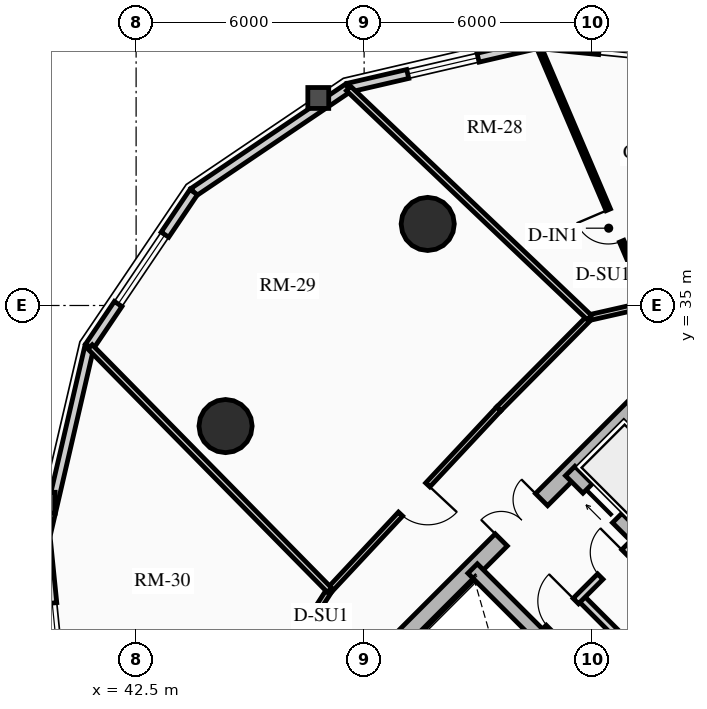
"""IFC4 building model, lengths in metres.
Left out: names, types, materials, properties, quantities, classifications, styles, units other than length and angle.
Written with IfcOpenShell. Run it as: python <this file> out.ifc"""

import sys

from ifc_helpers import new_model, si_unit, direction, frame, frame_2d, origin, origin_2d, place, context, subcontext, project, spatial, rectangle, circle, extrude, source, transform, mapped, element, fill, save


model = new_model("IFC4")
c1 = context("Model", 3, precision=1e-05, world=origin(), true_north=direction((0.0, 1.0)))
c2 = subcontext(c1, "Body", "Model", "MODEL_VIEW")
j1 = project(units=[si_unit("LENGTHUNIT", "METRE"), si_unit("PLANEANGLEUNIT", "RADIAN")], contexts=[c1])
p1 = place(None, origin())
s1 = spatial("IfcSite", under=j1, at=p1, CompositionType="ELEMENT")
p2 = place(p1, origin())
s2 = spatial("IfcBuilding", under=s1, at=p2, CompositionType="ELEMENT")
p3 = place(p2, frame((0.0, 0.0, 81.79)))
s3 = spatial("IfcBuildingStorey", under=s2, at=p3, CompositionType="ELEMENT", Elevation=81.79)
p4 = place(p3, frame((48.856, 25.578, 0.0), z_axis=(0.0, 0.0, 1.0), x_axis=(0.707106781187, 0.707106781187, 0.0)))
e1 = element("IfcWall", 1, at=p4, inside=s3, PredefinedType="SHEAR", context=c2, shape_type="SweptSolid", body=[
    extrude(rectangle(XDim=10.7, YDim=0.45, at=frame_2d((5.35, 0.0))), origin(), (0.0, 0.0, 1.0), 2.91),
])
m1 = source(origin(), c2, "Body", "SweptSolid", [
    extrude(rectangle(XDim=1.5, YDim=2.02, at=frame_2d((0.75, 1.01))), frame((0.0, 0.235, 0.0), z_axis=(0.0, -1.0, 0.0), x_axis=(1.0, 0.0, 0.0)), (0.0, 0.0, 1.0), 0.47),
])
p5 = place(p4, frame((4.6, 0.0, 0.0)))
e2 = element("IfcOpeningElement", 2, at=p5, cuts=e1, PredefinedType="OPENING", context=c2, shape_type="MappedRepresentation", body=[
    mapped(m1, transform((0.0, 0.0, 0.0), x_axis=(1.0, 0.0, 0.0), y_axis=(0.0, 1.0, 0.0), z_axis=(0.0, 0.0, 1.0), scale=1.0)),
])
p6 = place(p3, frame((61.078, 18.355, 0.0), z_axis=(0.0, 0.0, 1.0), x_axis=(-0.707106781187, 0.707106781187, 0.0)))
e3 = element("IfcWall", 3, at=p6, inside=s3, PredefinedType="SHEAR", context=c2, shape_type="SweptSolid", body=[
    extrude(rectangle(XDim=13.75, YDim=0.35, at=frame_2d((6.875, 0.0))), origin(), (0.0, 0.0, 1.0), 2.91),
])
m2 = source(origin(), c2, "Body", "SweptSolid", [
    extrude(rectangle(XDim=1.1, YDim=2.015, at=frame_2d((0.55, 1.007))), frame((0.0, 0.185, 0.0), z_axis=(0.0, -1.0, 0.0), x_axis=(1.0, 0.0, 0.0)), (0.0, 0.0, 1.0), 0.37),
])
p7 = place(p6, frame((4.875, 0.0, 0.0)))
e4 = element("IfcOpeningElement", 4, at=p7, cuts=e3, PredefinedType="OPENING", context=c2, shape_type="MappedRepresentation", body=[
    mapped(m2, transform((0.0, 0.0, 0.0), x_axis=(1.0, 0.0, 0.0), y_axis=(0.0, 1.0, 0.0), z_axis=(0.0, 0.0, 1.0), scale=1.0)),
])
m3 = source(origin(), c2, "Body", "SweptSolid", [
    extrude(rectangle(XDim=1.15, YDim=2.02, at=frame_2d((0.575, 1.01))), frame((0.0, 0.185, 0.0), z_axis=(0.0, -1.0, 0.0), x_axis=(1.0, 0.0, 0.0)), (0.0, 0.0, 1.0), 0.37),
])
p8 = place(p6, frame((7.295, 0.0, 0.0)))
e5 = element("IfcOpeningElement", 5, at=p8, cuts=e3, PredefinedType="OPENING", context=c2, shape_type="MappedRepresentation", body=[
    mapped(m3, transform((0.0, 0.0, 0.0), x_axis=(1.0, 0.0, 0.0), y_axis=(0.0, 1.0, 0.0), z_axis=(0.0, 0.0, 1.0), scale=1.0)),
])
p9 = place(p3, frame((63.645, 20.922, 0.0), z_axis=(0.0, 0.0, 1.0), x_axis=(-0.707106781187, 0.707106781187, 0.0)))
e6 = element("IfcWall", 6, at=p9, inside=s3, PredefinedType="SHEAR", context=c2, shape_type="SweptSolid", body=[
    extrude(rectangle(XDim=13.75, YDim=0.35, at=frame_2d((6.875, 0.0))), origin(), (0.0, 0.0, 1.0), 2.91),
])
p10 = place(p9, frame((10.0, 0.0, 0.0)))
e7 = element("IfcOpeningElement", 7, at=p10, cuts=e6, PredefinedType="OPENING", context=c2, shape_type="MappedRepresentation", body=[
    mapped(m2, transform((0.0, 0.0, 0.0), x_axis=(1.0, 0.0, 0.0), y_axis=(0.0, 1.0, 0.0), z_axis=(0.0, 0.0, 1.0), scale=1.0)),
])
p11 = place(p9, frame((12.0, 0.0, 0.0)))
e8 = element("IfcOpeningElement", 8, at=p11, cuts=e6, PredefinedType="OPENING", context=c2, shape_type="MappedRepresentation", body=[
    mapped(m2, transform((0.0, 0.0, 0.0), x_axis=(1.0, 0.0, 0.0), y_axis=(0.0, 1.0, 0.0), z_axis=(0.0, 0.0, 1.0), scale=1.0)),
])
p12 = place(p9, frame((5.305, 0.0, 0.0)))
e9 = element("IfcOpeningElement", 9, at=p12, cuts=e6, PredefinedType="OPENING", context=c2, shape_type="MappedRepresentation", body=[
    mapped(m3, transform((0.0, 0.0, 0.0), x_axis=(1.0, 0.0, 0.0), y_axis=(0.0, 1.0, 0.0), z_axis=(0.0, 0.0, 1.0), scale=1.0)),
])
for number, where, z_axis, x_axis in (
    (10, (50.173, 37.146, 0.0), (0.0, 0.0, 1.0), (1.0, 0.0, 0.0)),
    (11, (44.854, 31.827, 0.0), (0.0, 0.0, 1.0), (1.0, 0.0, 0.0)),
):
    element("IfcColumn", number, at=place(p3, frame(where, z_axis=z_axis, x_axis=x_axis)), inside=s3, PredefinedType="USERDEFINED", context=c2, shape_type="SweptSolid", body=[
        extrude(circle(Radius=0.7, at=origin_2d()), origin(), (0.0, 0.0, 1.0), 2.91),
    ])
p13 = place(p3, frame((53.067, 41.885, 0.0), z_axis=(0.0, 0.0, 1.0), x_axis=(0.994971754311, -0.10015591906, 0.0)))
e12 = element("IfcWall", 12, at=p13, inside=s3, PredefinedType="SOLIDWALL", context=c2, shape_type="SweptSolid", body=[
    extrude(rectangle(XDim=5.448, YDim=0.24, at=frame_2d((2.724, 0.0))), origin(), (0.0, 0.0, 1.0), 2.179),
])
m4 = source(origin(), c2, "Body", "SweptSolid", [
    extrude(rectangle(XDim=2.2, YDim=1.35, at=frame_2d((1.1, 0.675))), frame((0.0, 0.13, 0.0), z_axis=(0.0, -1.0, 0.0), x_axis=(1.0, 0.0, 0.0)), (0.0, 0.0, 1.0), 0.26),
])
p14 = place(p13, frame((1.624, 0.0, 0.65)))
e13 = element("IfcOpeningElement", 13, at=p14, cuts=e12, PredefinedType="OPENING", context=c2, shape_type="MappedRepresentation", body=[
    mapped(m4, transform((0.0, 0.0, 0.0), x_axis=(1.0, 0.0, 0.0), y_axis=(0.0, 1.0, 0.0), z_axis=(0.0, 0.0, 1.0), scale=1.0)),
])
p15 = place(p3, frame((48.08, 40.729, 0.0), z_axis=(0.0, 0.0, 1.0), x_axis=(0.974165631126, 0.225834725257, 0.0)))
e14 = element("IfcWall", 14, at=p15, inside=s3, PredefinedType="SOLIDWALL", context=c2, shape_type="SweptSolid", body=[
    extrude(rectangle(XDim=5.119, YDim=0.24, at=frame_2d((2.56, 0.0))), origin(), (0.0, 0.0, 1.0), 2.179),
])
m5 = source(origin(), c2, "Body", "SweptSolid", [
    extrude(rectangle(XDim=1.9, YDim=1.35, at=frame_2d((0.95, 0.675))), frame((0.0, 0.13, 0.0), z_axis=(0.0, -1.0, 0.0), x_axis=(1.0, 0.0, 0.0)), (0.0, 0.0, 1.0), 0.26),
])
p16 = place(p15, frame((1.609, 0.0, 0.65)))
e15 = element("IfcOpeningElement", 15, at=p16, cuts=e14, PredefinedType="OPENING", context=c2, shape_type="MappedRepresentation", body=[
    mapped(m5, transform((0.0, 0.0, 0.0), x_axis=(1.0, 0.0, 0.0), y_axis=(0.0, 1.0, 0.0), z_axis=(0.0, 0.0, 1.0), scale=1.0)),
])
p17 = place(p3, frame((44.015, 37.985, 0.0), z_axis=(0.0, 0.0, 1.0), x_axis=(0.828781148131, 0.559572880421, 0.0)))
e16 = element("IfcWall", 16, at=p17, inside=s3, PredefinedType="SOLIDWALL", context=c2, shape_type="SweptSolid", body=[
    extrude(rectangle(XDim=4.905, YDim=0.24, at=frame_2d((2.452, 0.0))), origin(), (0.0, 0.0, 1.0), 2.179),
])
p18 = place(p3, frame((41.271, 33.92, 0.0), z_axis=(0.0, 0.0, 1.0), x_axis=(0.559572880421, 0.828781148131, 0.0)))
e17 = element("IfcWall", 17, at=p18, inside=s3, PredefinedType="SOLIDWALL", context=c2, shape_type="SweptSolid", body=[
    extrude(rectangle(XDim=4.905, YDim=0.24, at=frame_2d((2.452, 0.0))), origin(), (0.0, 0.0, 1.0), 2.179),
])
p19 = place(p18, frame((1.352, 0.0, 0.65)))
e18 = element("IfcOpeningElement", 18, at=p19, cuts=e17, PredefinedType="OPENING", context=c2, shape_type="MappedRepresentation", body=[
    mapped(m4, transform((0.0, 0.0, 0.0), x_axis=(1.0, 0.0, 0.0), y_axis=(0.0, 1.0, 0.0), z_axis=(0.0, 0.0, 1.0), scale=1.0)),
])
p20 = place(p3, frame((40.115, 28.933, 0.0), z_axis=(0.0, 0.0, 1.0), x_axis=(0.225834725257, 0.974165631126, 0.0)))
e19 = element("IfcWall", 19, at=p20, inside=s3, PredefinedType="SOLIDWALL", context=c2, shape_type="SweptSolid", body=[
    extrude(rectangle(XDim=5.119, YDim=0.24, at=frame_2d((2.56, 0.0))), origin(), (0.0, 0.0, 1.0), 2.179),
])
p21 = place(p3, frame((40.661, 23.513, 0.0), z_axis=(0.0, 0.0, 1.0), x_axis=(-0.10015591906, 0.994971754311, 0.0)))
e20 = element("IfcWall", 20, at=p21, inside=s3, PredefinedType="SOLIDWALL", context=c2, shape_type="SweptSolid", body=[
    extrude(rectangle(XDim=5.448, YDim=0.24, at=frame_2d((2.724, 0.0))), origin(), (0.0, 0.0, 1.0), 2.179),
])
p22 = place(p21, frame((1.774, 0.0, 0.65)))
e21 = element("IfcOpeningElement", 21, at=p22, cuts=e20, PredefinedType="OPENING", context=c2, shape_type="MappedRepresentation", body=[
    mapped(m5, transform((0.0, 0.0, 0.0), x_axis=(1.0, 0.0, 0.0), y_axis=(0.0, 1.0, 0.0), z_axis=(0.0, 0.0, 1.0), scale=1.0)),
])
p23 = place(p3, frame((54.961, 24.719, 0.0), z_axis=(0.0, 0.0, 1.0), x_axis=(0.707106781187, 0.707106781187, 0.0)))
e22 = element("IfcWall", 22, at=p23, inside=s3, PredefinedType="PARTITIONING", context=c2, shape_type="SweptSolid", body=[
    extrude(rectangle(XDim=3.28, YDim=0.2, at=frame_2d((1.64, 0.0))), origin(), (0.0, 0.0, 1.0), 2.655),
])
m6 = source(origin(), c2, "Body", "SweptSolid", [
    extrude(rectangle(XDim=0.9, YDim=2.005, at=frame_2d((0.45, 1.002))), frame((0.0, 0.11, 0.0), z_axis=(0.0, -1.0, 0.0), x_axis=(1.0, 0.0, 0.0)), (0.0, 0.0, 1.0), 0.22),
])
p24 = place(p23, frame((0.16, 0.0, 0.0)))
e23 = element("IfcOpeningElement", 23, at=p24, cuts=e22, PredefinedType="OPENING", context=c2, shape_type="MappedRepresentation", body=[
    mapped(m6, transform((0.0, 0.0, 0.0), x_axis=(1.0, 0.0, 0.0), y_axis=(0.0, 1.0, 0.0), z_axis=(0.0, 0.0, 1.0), scale=1.0)),
])
p25 = place(p3, frame((55.874, 25.631, 0.0), z_axis=(0.0, 0.0, 1.0), x_axis=(-0.707157639372, 0.707055919343, 0.0)))
e24 = element("IfcWall", 24, at=p25, inside=s3, PredefinedType="PARTITIONING", context=c2, shape_type="SweptSolid", body=[
    extrude(rectangle(XDim=2.4, YDim=0.2, at=frame_2d((1.2, 0.0))), origin(), (0.0, 0.0, 1.0), 2.655),
])
p26 = place(p3, frame((53.264, 26.416, 0.0), z_axis=(0.0, 0.0, 1.0), x_axis=(0.707106781187, 0.707106781187, 0.0)))
e25 = element("IfcWall", 25, at=p26, inside=s3, PredefinedType="PARTITIONING", context=c2, shape_type="SweptSolid", body=[
    extrude(rectangle(XDim=3.28, YDim=0.2, at=frame_2d((1.64, 0.0))), origin(), (0.0, 0.0, 1.0), 2.655),
])
m7 = source(origin(), c2, "Body", "SweptSolid", [
    extrude(rectangle(XDim=1.0, YDim=2.015, at=frame_2d((0.5, 1.007))), frame((0.0, 0.11, 0.0), z_axis=(0.0, -1.0, 0.0), x_axis=(1.0, 0.0, 0.0)), (0.0, 0.0, 1.0), 0.22),
])
p27 = place(p26, frame((0.14, 0.0, 0.0)))
e26 = element("IfcOpeningElement", 26, at=p27, cuts=e25, PredefinedType="OPENING", context=c2, shape_type="MappedRepresentation", body=[
    mapped(m7, transform((0.0, 0.0, 0.0), x_axis=(1.0, 0.0, 0.0), y_axis=(0.0, 1.0, 0.0), z_axis=(0.0, 0.0, 1.0), scale=1.0)),
])
p28 = place(p26, frame((2.05, 0.0, 0.0)))
e27 = element("IfcOpeningElement", 27, at=p28, cuts=e25, PredefinedType="OPENING", context=c2, shape_type="MappedRepresentation", body=[
    mapped(m6, transform((0.0, 0.0, 0.0), x_axis=(1.0, 0.0, 0.0), y_axis=(0.0, 1.0, 0.0), z_axis=(0.0, 0.0, 1.0), scale=1.0)),
])
p29 = place(p3, frame((55.984, 35.035, 0.0), z_axis=(0.0, 0.0, 1.0), x_axis=(-0.975290305708, -0.22092718165, 0.0)))
e28 = element("IfcWall", 28, at=p29, inside=s3, PredefinedType="PARTITIONING", context=c2, shape_type="SweptSolid", body=[
    extrude(rectangle(XDim=1.597, YDim=0.15, at=frame_2d((0.798, 0.0))), origin(), (0.0, 0.0, 1.0), 2.225),
])
p30 = place(p3, frame((54.427, 34.683, 0.0), z_axis=(0.0, 0.0, 1.0), x_axis=(-0.704178989986, -0.710022499687, 0.0)))
e29 = element("IfcWall", 29, at=p30, inside=s3, PredefinedType="PARTITIONING", context=c2, shape_type="SweptSolid", body=[
    extrude(rectangle(XDim=3.384, YDim=0.15, at=frame_2d((1.692, 0.0))), origin(), (0.0, 0.0, 1.0), 2.225),
])
p31 = place(p3, frame((52.043, 32.28, 0.0), z_axis=(0.0, 0.0, 1.0), x_axis=(-0.682606081633, -0.730786519661, 0.0)))
e30 = element("IfcWall", 30, at=p31, inside=s3, PredefinedType="PARTITIONING", context=c2, shape_type="SweptSolid", body=[
    extrude(rectangle(XDim=6.527, YDim=0.15, at=frame_2d((3.263, 0.0))), origin(), (0.0, 0.0, 1.0), 2.225),
])
m8 = source(origin(), c2, "Body", "SweptSolid", [
    extrude(rectangle(XDim=1.05, YDim=2.015, at=frame_2d((0.525, 1.007))), frame((0.0, 0.085, 0.0), z_axis=(0.0, -1.0, 0.0), x_axis=(1.0, 0.0, 0.0)), (0.0, 0.0, 1.0), 0.17),
])
p32 = place(p31, frame((2.738, 0.0, 0.0)))
e31 = element("IfcOpeningElement", 31, at=p32, cuts=e30, PredefinedType="OPENING", context=c2, shape_type="MappedRepresentation", body=[
    mapped(m8, transform((0.0, 0.0, 0.0), x_axis=(1.0, 0.0, 0.0), y_axis=(0.0, 1.0, 0.0), z_axis=(0.0, 0.0, 1.0), scale=1.0)),
])
p33 = place(p3, frame((47.588, 27.51, 0.0), z_axis=(0.0, 0.0, 1.0), x_axis=(-0.540202619347, -0.841534984449, 0.0)))
e32 = element("IfcWall", 32, at=p33, inside=s3, PredefinedType="PARTITIONING", context=c2, shape_type="SweptSolid", body=[
    extrude(rectangle(XDim=1.935, YDim=0.15, at=frame_2d((0.967, 0.0))), origin(), (0.0, 0.0, 1.0), 2.225),
])
p34 = place(p3, frame((54.427, 34.683, 0.0), z_axis=(0.0, 0.0, 1.0), x_axis=(-0.72454072322, 0.689231993161, 0.0)))
e33 = element("IfcWall", 33, at=p34, inside=s3, PredefinedType="PARTITIONING", context=c2, shape_type="SweptSolid", body=[
    extrude(rectangle(XDim=8.747, YDim=0.16, at=frame_2d((4.374, 0.0))), origin(), (0.0, 0.0, 1.0), 2.179),
])
p35 = place(p3, frame((47.588, 27.51, 0.0), z_axis=(0.0, 0.0, 1.0), x_axis=(-0.701457073903, 0.712711704318, 0.0)))
e34 = element("IfcWall", 34, at=p35, inside=s3, PredefinedType="PARTITIONING", context=c2, shape_type="SweptSolid", body=[
    extrude(rectangle(XDim=8.981, YDim=0.16, at=frame_2d((4.49, 0.0))), origin(), (0.0, 0.0, 1.0), 2.179),
])
p36 = place(p3, frame((55.984, 35.035, 0.0), z_axis=(0.0, 0.0, 1.0), x_axis=(-0.392438685048, 0.919778168081, 0.0)))
e35 = element("IfcWall", 35, at=p36, inside=s3, PredefinedType="PARTITIONING", context=c2, shape_type="SweptSolid", body=[
    extrude(rectangle(XDim=7.426, YDim=0.125, at=frame_2d((3.713, 0.0))), origin(), (0.0, 0.0, 1.0), 2.179),
])
m9 = source(origin(), c2, "Body", "SweptSolid", [
    extrude(rectangle(XDim=0.9, YDim=2.005, at=frame_2d((0.45, 1.002))), frame((0.0, 0.073, 0.0), z_axis=(0.0, -1.0, 0.0), x_axis=(1.0, 0.0, 0.0)), (0.0, 0.0, 1.0), 0.145),
])
p37 = place(p36, frame((1.8, 0.0, 0.0)))
e36 = element("IfcOpeningElement", 36, at=p37, cuts=e35, PredefinedType="OPENING", context=c2, shape_type="MappedRepresentation", body=[
    mapped(m9, transform((0.0, 0.0, 0.0), x_axis=(1.0, 0.0, 0.0), y_axis=(0.0, 1.0, 0.0), z_axis=(0.0, 0.0, 1.0), scale=1.0)),
])
m10 = source(origin(), c2, "Body", "SweptSolid", [
    extrude(rectangle(XDim=2.2, YDim=1.35, at=frame_2d((1.1, 0.675))), frame((0.0, 0.03, 0.0), z_axis=(0.0, -1.0, 0.0), x_axis=(1.0, 0.0, 0.0)), (0.0, 0.0, 1.0), 0.06),
])
p38 = place(p14, origin())
e37 = element("IfcWindow", 37, at=p38, inside=s3, PartitioningType="DOUBLE_PANEL_VERTICAL", PredefinedType="WINDOW", context=c2, shape_type="MappedRepresentation", body=[
    mapped(m10, transform((0.0, 0.0, 0.0), x_axis=(1.0, 0.0, 0.0), y_axis=(0.0, 1.0, 0.0), z_axis=(0.0, 0.0, 1.0), scale=1.0)),
])
fill(e13, e37)
m11 = source(origin(), c2, "Body", "SweptSolid", [
    extrude(rectangle(XDim=1.9, YDim=1.35, at=frame_2d((0.95, 0.675))), frame((0.0, 0.03, 0.0), z_axis=(0.0, -1.0, 0.0), x_axis=(1.0, 0.0, 0.0)), (0.0, 0.0, 1.0), 0.06),
])
p39 = place(p16, origin())
e38 = element("IfcWindow", 38, at=p39, inside=s3, PartitioningType="DOUBLE_PANEL_VERTICAL", PredefinedType="WINDOW", context=c2, shape_type="MappedRepresentation", body=[
    mapped(m11, transform((0.0, 0.0, 0.0), x_axis=(1.0, 0.0, 0.0), y_axis=(0.0, 1.0, 0.0), z_axis=(0.0, 0.0, 1.0), scale=1.0)),
])
fill(e15, e38)
p40 = place(p19, origin())
e39 = element("IfcWindow", 39, at=p40, inside=s3, PartitioningType="DOUBLE_PANEL_VERTICAL", PredefinedType="WINDOW", context=c2, shape_type="MappedRepresentation", body=[
    mapped(m10, transform((0.0, 0.0, 0.0), x_axis=(1.0, 0.0, 0.0), y_axis=(0.0, 1.0, 0.0), z_axis=(0.0, 0.0, 1.0), scale=1.0)),
])
fill(e18, e39)
p41 = place(p22, origin())
e40 = element("IfcWindow", 40, at=p41, inside=s3, PartitioningType="DOUBLE_PANEL_VERTICAL", PredefinedType="WINDOW", context=c2, shape_type="MappedRepresentation", body=[
    mapped(m11, transform((0.0, 0.0, 0.0), x_axis=(1.0, 0.0, 0.0), y_axis=(0.0, 1.0, 0.0), z_axis=(0.0, 0.0, 1.0), scale=1.0)),
])
fill(e21, e40)
m12 = source(origin(), c2, "Body", "SweptSolid", [
    extrude(rectangle(XDim=1.1, YDim=2.015, at=frame_2d((0.55, 1.007))), frame((0.0, 0.025, 0.0), z_axis=(0.0, -1.0, 0.0), x_axis=(1.0, 0.0, 0.0)), (0.0, 0.0, 1.0), 0.05),
])
p42 = place(p11, origin())
e41 = element("IfcDoor", 41, at=p42, inside=s3, OperationType="SLIDING_TO_RIGHT", PredefinedType="DOOR", context=c2, shape_type="MappedRepresentation", body=[
    mapped(m12, transform((0.0, 0.0, 0.0), x_axis=(1.0, 0.0, 0.0), y_axis=(0.0, 1.0, 0.0), z_axis=(0.0, 0.0, 1.0), scale=1.0)),
])
fill(e8, e41)
m13 = source(origin(), c2, "Body", "SweptSolid", [
    extrude(rectangle(XDim=1.5, YDim=2.02, at=frame_2d((0.75, 1.01))), frame((0.0, 0.025, 0.0), z_axis=(0.0, -1.0, 0.0), x_axis=(1.0, 0.0, 0.0)), (0.0, 0.0, 1.0), 0.05),
])
p43 = place(p5, origin())
e42 = element("IfcDoor", 42, at=p43, inside=s3, OperationType="DOUBLE_DOOR_SINGLE_SWING", PredefinedType="DOOR", context=c2, shape_type="MappedRepresentation", body=[
    mapped(m13, transform((0.0, 0.0, 0.0), x_axis=(1.0, 0.0, 0.0), y_axis=(0.0, 1.0, 0.0), z_axis=(0.0, 0.0, 1.0), scale=1.0)),
])
fill(e2, e42)
m14 = source(origin(), c2, "Body", "SweptSolid", [
    extrude(rectangle(XDim=1.0, YDim=2.015, at=frame_2d((0.5, 1.007))), frame((0.0, 0.025, 0.0), z_axis=(0.0, -1.0, 0.0), x_axis=(1.0, 0.0, 0.0)), (0.0, 0.0, 1.0), 0.05),
])
p44 = place(p27, origin())
e43 = element("IfcDoor", 43, at=p44, inside=s3, OperationType="SINGLE_SWING_RIGHT", PredefinedType="DOOR", context=c2, shape_type="MappedRepresentation", body=[
    mapped(m14, transform((0.0, 0.0, 0.0), x_axis=(1.0, 0.0, 0.0), y_axis=(0.0, 1.0, 0.0), z_axis=(0.0, 0.0, 1.0), scale=1.0)),
])
fill(e26, e43)
m15 = source(origin(), c2, "Body", "SweptSolid", [
    extrude(rectangle(XDim=0.9, YDim=2.005, at=frame_2d((0.45, 1.002))), frame((0.0, 0.025, 0.0), z_axis=(0.0, -1.0, 0.0), x_axis=(1.0, 0.0, 0.0)), (0.0, 0.0, 1.0), 0.05),
])
p45 = place(p28, origin())
e44 = element("IfcDoor", 44, at=p45, inside=s3, OperationType="SINGLE_SWING_RIGHT", PredefinedType="DOOR", context=c2, shape_type="MappedRepresentation", body=[
    mapped(m15, transform((0.0, 0.0, 0.0), x_axis=(1.0, 0.0, 0.0), y_axis=(0.0, 1.0, 0.0), z_axis=(0.0, 0.0, 1.0), scale=1.0)),
])
fill(e27, e44)
p46 = place(p37, origin())
e45 = element("IfcDoor", 45, at=p46, inside=s3, OperationType="SINGLE_SWING_RIGHT", PredefinedType="DOOR", context=c2, shape_type="MappedRepresentation", body=[
    mapped(m15, transform((0.0, 0.0, 0.0), x_axis=(1.0, 0.0, 0.0), y_axis=(0.0, 1.0, 0.0), z_axis=(0.0, 0.0, 1.0), scale=1.0)),
])
fill(e36, e45)
m16 = source(origin(), c2, "Body", "SweptSolid", [
    extrude(rectangle(XDim=1.05, YDim=2.015, at=frame_2d((0.525, 1.007))), frame((0.0, 0.025, 0.0), z_axis=(0.0, -1.0, 0.0), x_axis=(1.0, 0.0, 0.0)), (0.0, 0.0, 1.0), 0.05),
])
p47 = place(p32, origin())
e46 = element("IfcDoor", 46, at=p47, inside=s3, OperationType="SINGLE_SWING_LEFT", PredefinedType="DOOR", context=c2, shape_type="MappedRepresentation", body=[
    mapped(m16, transform((0.0, 0.0, 0.0), x_axis=(1.0, 0.0, 0.0), y_axis=(0.0, 1.0, 0.0), z_axis=(0.0, 0.0, 1.0), scale=1.0)),
])
fill(e31, e46)
save(model, sys.argv[1])
